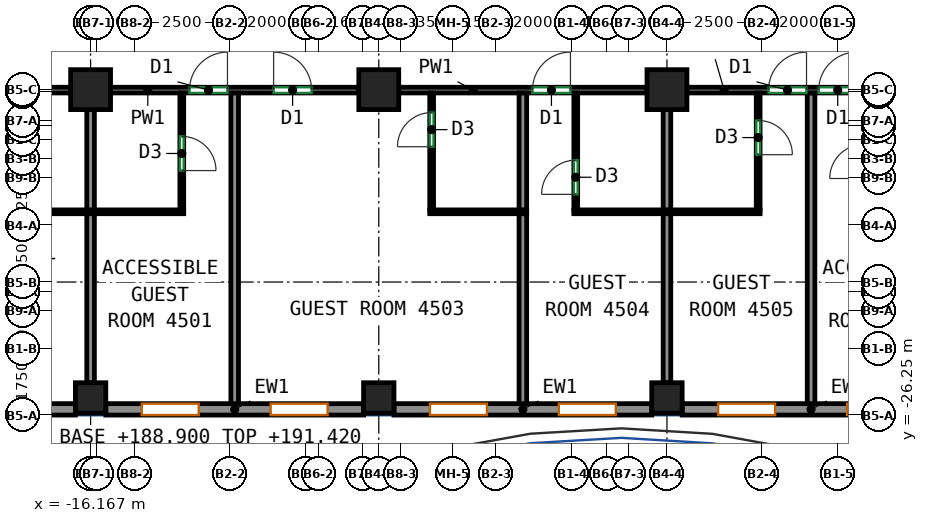
"""IFC4 building model, lengths in metres.
Left out: names, types, materials, properties, quantities, classifications, styles, units other than length and angle.
Written with IfcOpenShell. Run it as: python <this file> out.ifc"""

import sys

from ifc_helpers import new_model, si_unit, direction, frame, frame_2d, origin, origin_2d, place, context, subcontext, project, spatial, rectangle, extrude, source, transform, mapped, element, fill, save


model = new_model("IFC4")
c1 = context("Model", 3, precision=1e-05, world=origin(), true_north=direction((0.0, 1.0)))
c2 = subcontext(c1, "Body", "Model", "MODEL_VIEW")
j1 = project(units=[si_unit("LENGTHUNIT", "METRE"), si_unit("PLANEANGLEUNIT", "RADIAN")], contexts=[c1])
p1 = place(None, origin())
s1 = spatial("IfcSite", under=j1, at=p1, CompositionType="ELEMENT")
p2 = place(p1, origin())
s2 = spatial("IfcBuilding", under=s1, at=p2, CompositionType="ELEMENT")
p3 = place(p2, frame((0.0, 0.0, 188.9)))
s3 = spatial("IfcBuildingStorey", under=s2, at=p3, CompositionType="ELEMENT", Elevation=188.9)
m1 = source(origin(), c2, "Body", "SweptSolid", [
    extrude(rectangle(XDim=0.8, YDim=0.8, at=origin_2d()), origin(), (0.0, 0.0, 1.0), 3.12),
])
p4 = place(p3, frame((-16.167, -25.8, 0.0), z_axis=(0.0, 0.0, 1.0), x_axis=(1.0, 0.0, 0.0)))
e1 = element("IfcColumn", 1, at=p4, inside=s3, PredefinedType="COLUMN", context=c2, shape_type="MappedRepresentation", body=[
    mapped(m1, transform((0.0, 0.0, 0.0))),
])
m2 = source(origin(), c2, "Body", "SweptSolid", [
    extrude(rectangle(XDim=1.05, YDim=1.05, at=origin_2d()), origin(), (0.0, 0.0, 1.0), 3.12),
])
p5 = place(p3, frame((-16.167, -17.688, 0.0), z_axis=(0.0, 0.0, 1.0), x_axis=(1.0, 0.0, 0.0)))
e2 = element("IfcColumn", 2, at=p5, inside=s3, PredefinedType="COLUMN", context=c2, shape_type="MappedRepresentation", body=[
    mapped(m2, transform((0.0, 0.0, 0.0))),
])
p6 = place(p3, frame((-8.583, -25.8, 0.0), z_axis=(0.0, 0.0, 1.0), x_axis=(1.0, 0.0, 0.0)))
e3 = element("IfcColumn", 3, at=p6, inside=s3, PredefinedType="COLUMN", context=c2, shape_type="MappedRepresentation", body=[
    mapped(m1, transform((0.0, 0.0, 0.0))),
])
p7 = place(p3, frame((-8.583, -17.688, 0.0), z_axis=(0.0, 0.0, 1.0), x_axis=(1.0, 0.0, 0.0)))
e4 = element("IfcColumn", 4, at=p7, inside=s3, PredefinedType="COLUMN", context=c2, shape_type="MappedRepresentation", body=[
    mapped(m2, transform((0.0, 0.0, 0.0))),
])
p8 = place(p3, frame((-1.0, -25.8, 0.0), z_axis=(0.0, 0.0, 1.0), x_axis=(1.0, 0.0, 0.0)))
e5 = element("IfcColumn", 5, at=p8, inside=s3, PredefinedType="COLUMN", context=c2, shape_type="MappedRepresentation", body=[
    mapped(m1, transform((0.0, 0.0, 0.0))),
])
p9 = place(p3, frame((-1.0, -17.688, 0.0), z_axis=(0.0, 0.0, 1.0), x_axis=(1.0, 0.0, 0.0)))
e6 = element("IfcColumn", 6, at=p9, inside=s3, PredefinedType="COLUMN", context=c2, shape_type="MappedRepresentation", body=[
    mapped(m2, transform((0.0, 0.0, 0.0))),
])
m3 = source(origin(), c2, "Body", "SweptSolid", [
    extrude(rectangle(XDim=6.783, YDim=0.3, at=frame_2d((3.392, 0.0))), origin(), (0.0, 0.0, 1.0), 3.12),
])
p10 = place(p3, frame((-23.35, -26.1, 0.0), z_axis=(0.0, 0.0, 1.0), x_axis=(1.0, 0.0, 0.0)))
e7 = element("IfcWall", 7, at=p10, inside=s3, PredefinedType="SOLIDWALL", context=c2, shape_type="MappedRepresentation", body=[
    mapped(m3, transform((0.0, 0.0, 0.0))),
])
p11 = place(p10, frame((0.946, 0.0, 0.85)))
e8 = element("IfcOpeningElement", 8, at=p11, cuts=e7, PredefinedType="OPENING", context=c2, shape_type="SweptSolid", body=[
    extrude(rectangle(XDim=1.5, YDim=1.95, at=frame_2d((0.75, 0.975))), frame((0.0, 0.16, 0.0), z_axis=(0.0, -1.0, 0.0), x_axis=(1.0, 0.0, 0.0)), (0.0, 0.0, 1.0), 0.32),
])
p12 = place(p10, frame((4.337, 0.0, 0.85)))
e9 = element("IfcOpeningElement", 9, at=p12, cuts=e7, PredefinedType="OPENING", context=c2, shape_type="SweptSolid", body=[
    extrude(rectangle(XDim=1.5, YDim=1.95, at=frame_2d((0.75, 0.975))), frame((0.0, 0.16, 0.0), z_axis=(0.0, -1.0, 0.0), x_axis=(1.0, 0.0, 0.0)), (0.0, 0.0, 1.0), 0.32),
])
m4 = source(origin(), c2, "Body", "SweptSolid", [
    extrude(rectangle(XDim=6.783, YDim=0.3, at=frame_2d((3.392, 0.0))), origin(), (0.0, 0.0, 1.0), 3.12),
])
p13 = place(p3, frame((-15.767, -26.1, 0.0), z_axis=(0.0, 0.0, 1.0), x_axis=(1.0, 0.0, 0.0)))
e10 = element("IfcWall", 10, at=p13, inside=s3, PredefinedType="SOLIDWALL", context=c2, shape_type="MappedRepresentation", body=[
    mapped(m4, transform((0.0, 0.0, 0.0))),
])
p14 = place(p13, frame((0.946, 0.0, 0.85)))
e11 = element("IfcOpeningElement", 11, at=p14, cuts=e10, PredefinedType="OPENING", context=c2, shape_type="SweptSolid", body=[
    extrude(rectangle(XDim=1.5, YDim=1.95, at=frame_2d((0.75, 0.975))), frame((0.0, 0.16, 0.0), z_axis=(0.0, -1.0, 0.0), x_axis=(1.0, 0.0, 0.0)), (0.0, 0.0, 1.0), 0.32),
])
p15 = place(p13, frame((4.338, 0.0, 0.85)))
e12 = element("IfcOpeningElement", 12, at=p15, cuts=e10, PredefinedType="OPENING", context=c2, shape_type="SweptSolid", body=[
    extrude(rectangle(XDim=1.5, YDim=1.95, at=frame_2d((0.75, 0.975))), frame((0.0, 0.16, 0.0), z_axis=(0.0, -1.0, 0.0), x_axis=(1.0, 0.0, 0.0)), (0.0, 0.0, 1.0), 0.32),
])
p16 = place(p3, frame((-8.183, -26.1, 0.0), z_axis=(0.0, 0.0, 1.0), x_axis=(1.0, 0.0, 0.0)))
e13 = element("IfcWall", 13, at=p16, inside=s3, PredefinedType="SOLIDWALL", context=c2, shape_type="MappedRepresentation", body=[
    mapped(m3, transform((0.0, 0.0, 0.0))),
])
p17 = place(p16, frame((0.946, 0.0, 0.85)))
e14 = element("IfcOpeningElement", 14, at=p17, cuts=e13, PredefinedType="OPENING", context=c2, shape_type="SweptSolid", body=[
    extrude(rectangle(XDim=1.5, YDim=1.95, at=frame_2d((0.75, 0.975))), frame((0.0, 0.16, 0.0), z_axis=(0.0, -1.0, 0.0), x_axis=(1.0, 0.0, 0.0)), (0.0, 0.0, 1.0), 0.32),
])
p18 = place(p16, frame((4.337, 0.0, 0.85)))
e15 = element("IfcOpeningElement", 15, at=p18, cuts=e13, PredefinedType="OPENING", context=c2, shape_type="SweptSolid", body=[
    extrude(rectangle(XDim=1.5, YDim=1.95, at=frame_2d((0.75, 0.975))), frame((0.0, 0.16, 0.0), z_axis=(0.0, -1.0, 0.0), x_axis=(1.0, 0.0, 0.0)), (0.0, 0.0, 1.0), 0.32),
])
p19 = place(p3, frame((-0.6, -26.1, 0.0), z_axis=(0.0, 0.0, 1.0), x_axis=(1.0, 0.0, 0.0)))
e16 = element("IfcWall", 16, at=p19, inside=s3, PredefinedType="SOLIDWALL", context=c2, shape_type="MappedRepresentation", body=[
    mapped(m3, transform((0.0, 0.0, 0.0))),
])
p20 = place(p19, frame((0.946, 0.0, 0.85)))
e17 = element("IfcOpeningElement", 17, at=p20, cuts=e16, PredefinedType="OPENING", context=c2, shape_type="SweptSolid", body=[
    extrude(rectangle(XDim=1.5, YDim=1.95, at=frame_2d((0.75, 0.975))), frame((0.0, 0.16, 0.0), z_axis=(0.0, -1.0, 0.0), x_axis=(1.0, 0.0, 0.0)), (0.0, 0.0, 1.0), 0.32),
])
p21 = place(p19, frame((4.337, 0.0, 0.85)))
e18 = element("IfcOpeningElement", 18, at=p21, cuts=e16, PredefinedType="OPENING", context=c2, shape_type="SweptSolid", body=[
    extrude(rectangle(XDim=1.5, YDim=1.95, at=frame_2d((0.75, 0.975))), frame((0.0, 0.16, 0.0), z_axis=(0.0, -1.0, 0.0), x_axis=(1.0, 0.0, 0.0)), (0.0, 0.0, 1.0), 0.32),
])
p22 = place(p3, frame((-23.75, -17.7, 0.0), z_axis=(0.0, 0.0, 1.0), x_axis=(1.0, 0.0, 0.0)))
e19 = element("IfcWall", 19, at=p22, inside=s3, PredefinedType="PARTITIONING", context=c2, shape_type="SweptSolid", body=[
    extrude(rectangle(XDim=7.058, YDim=0.15, at=frame_2d((3.529, 0.0))), origin(), (0.0, 0.0, 1.0), 2.52),
])
p23 = place(p22, frame((0.201, 0.0, 0.0)))
e20 = element("IfcOpeningElement", 20, at=p23, cuts=e19, PredefinedType="OPENING", context=c2, shape_type="SweptSolid", body=[
    extrude(rectangle(XDim=1.0, YDim=2.1, at=frame_2d((0.5, 1.05))), frame((0.0, 0.085, 0.0), z_axis=(0.0, -1.0, 0.0), x_axis=(1.0, 0.0, 0.0)), (0.0, 0.0, 1.0), 0.17),
])
p24 = place(p22, frame((3.981, 0.0, 0.0)))
e21 = element("IfcOpeningElement", 21, at=p24, cuts=e19, PredefinedType="OPENING", context=c2, shape_type="SweptSolid", body=[
    extrude(rectangle(XDim=1.0, YDim=2.1, at=frame_2d((0.5, 1.05))), frame((0.0, 0.085, 0.0), z_axis=(0.0, -1.0, 0.0), x_axis=(1.0, 0.0, 0.0)), (0.0, 0.0, 1.0), 0.17),
])
p25 = place(p3, frame((-15.642, -17.7, 0.0), z_axis=(0.0, 0.0, 1.0), x_axis=(1.0, 0.0, 0.0)))
e22 = element("IfcWall", 22, at=p25, inside=s3, PredefinedType="PARTITIONING", context=c2, shape_type="SweptSolid", body=[
    extrude(rectangle(XDim=6.534, YDim=0.15, at=frame_2d((3.267, 0.0))), origin(), (0.0, 0.0, 1.0), 3.12),
])
p26 = place(p25, frame((2.077, 0.0, 0.0)))
e23 = element("IfcOpeningElement", 23, at=p26, cuts=e22, PredefinedType="OPENING", context=c2, shape_type="SweptSolid", body=[
    extrude(rectangle(XDim=1.0, YDim=2.1, at=frame_2d((0.5, 1.05))), frame((0.0, 0.085, 0.0), z_axis=(0.0, -1.0, 0.0), x_axis=(1.0, 0.0, 0.0)), (0.0, 0.0, 1.0), 0.17),
])
p27 = place(p25, frame((4.291, 0.0, 0.0)))
e24 = element("IfcOpeningElement", 24, at=p27, cuts=e22, PredefinedType="OPENING", context=c2, shape_type="SweptSolid", body=[
    extrude(rectangle(XDim=1.0, YDim=2.1, at=frame_2d((0.5, 1.05))), frame((0.0, 0.085, 0.0), z_axis=(0.0, -1.0, 0.0), x_axis=(1.0, 0.0, 0.0)), (0.0, 0.0, 1.0), 0.17),
])
p28 = place(p3, frame((-8.058, -17.7, 0.0), z_axis=(0.0, 0.0, 1.0), x_axis=(1.0, 0.0, 0.0)))
e25 = element("IfcWall", 25, at=p28, inside=s3, PredefinedType="PARTITIONING", context=c2, shape_type="SweptSolid", body=[
    extrude(rectangle(XDim=6.533, YDim=0.15, at=frame_2d((3.267, 0.0))), origin(), (0.0, 0.0, 1.0), 3.12),
])
p29 = place(p28, frame((3.518, 0.0, 0.0)))
e26 = element("IfcOpeningElement", 26, at=p29, cuts=e25, PredefinedType="OPENING", context=c2, shape_type="SweptSolid", body=[
    extrude(rectangle(XDim=1.0, YDim=2.1, at=frame_2d((0.5, 1.05))), frame((0.0, 0.085, 0.0), z_axis=(0.0, -1.0, 0.0), x_axis=(1.0, 0.0, 0.0)), (0.0, 0.0, 1.0), 0.17),
])
p30 = place(p3, frame((-0.475, -17.7, 0.0), z_axis=(0.0, 0.0, 1.0), x_axis=(1.0, 0.0, 0.0)))
e27 = element("IfcWall", 27, at=p30, inside=s3, PredefinedType="PARTITIONING", context=c2, shape_type="SweptSolid", body=[
    extrude(rectangle(XDim=6.533, YDim=0.15, at=frame_2d((3.267, 0.0))), origin(), (0.0, 0.0, 1.0), 3.12),
])
p31 = place(p30, frame((2.147, 0.0, 0.0)))
e28 = element("IfcOpeningElement", 28, at=p31, cuts=e27, PredefinedType="OPENING", context=c2, shape_type="SweptSolid", body=[
    extrude(rectangle(XDim=1.0, YDim=2.1, at=frame_2d((0.5, 1.05))), frame((0.0, 0.085, 0.0), z_axis=(0.0, -1.0, 0.0), x_axis=(1.0, 0.0, 0.0)), (0.0, 0.0, 1.0), 0.17),
])
p32 = place(p30, frame((3.468, 0.0, 0.0)))
e29 = element("IfcOpeningElement", 29, at=p32, cuts=e27, PredefinedType="OPENING", context=c2, shape_type="SweptSolid", body=[
    extrude(rectangle(XDim=1.0, YDim=2.1, at=frame_2d((0.5, 1.05))), frame((0.0, 0.085, 0.0), z_axis=(0.0, -1.0, 0.0), x_axis=(1.0, 0.0, 0.0)), (0.0, 0.0, 1.0), 0.17),
])
p33 = place(p3, frame((-18.617, -20.902, 0.0), z_axis=(0.0, 0.0, 1.0), x_axis=(1.0, 0.0, 0.0)))
e30 = element("IfcWall", 30, at=p33, inside=s3, PredefinedType="PARTITIONING", context=c2, shape_type="SweptSolid", body=[
    extrude(rectangle(XDim=4.9, YDim=0.1, at=frame_2d((2.45, 0.0))), origin(), (0.0, 0.0, 1.0), 3.12),
])
p34 = place(p3, frame((-16.167, -25.4, 0.0), z_axis=(0.0, 0.0, 1.0), x_axis=(0.0, 1.0, 0.0)))
e31 = element("IfcWall", 31, at=p34, inside=s3, PredefinedType="PARTITIONING", context=c2, shape_type="SweptSolid", body=[
    extrude(rectangle(XDim=4.448, YDim=0.2, at=frame_2d((2.224, 0.0))), origin(), (0.0, 0.0, 1.0), 3.12),
])
p35 = place(p3, frame((-16.167, -20.852, 0.0), z_axis=(0.0, 0.0, 1.0), x_axis=(0.0, 1.0, 0.0)))
e32 = element("IfcWall", 32, at=p35, inside=s3, PredefinedType="PARTITIONING", context=c2, shape_type="SweptSolid", body=[
    extrude(rectangle(XDim=2.64, YDim=0.2, at=frame_2d((1.32, 0.0))), origin(), (0.0, 0.0, 1.0), 3.12),
])
p36 = place(p3, frame((-13.767, -17.777, 0.0), z_axis=(0.0, 0.0, 1.0), x_axis=(0.0, -1.0, 0.0)))
e33 = element("IfcWall", 33, at=p36, inside=s3, PredefinedType="PARTITIONING", context=c2, shape_type="SweptSolid", body=[
    extrude(rectangle(XDim=3.075, YDim=0.1, at=frame_2d((1.538, 0.0))), origin(), (0.0, 0.0, 1.0), 3.12),
])
p37 = place(p36, frame((1.14, 0.0, 0.0)))
e34 = element("IfcOpeningElement", 34, at=p37, cuts=e33, PredefinedType="OPENING", context=c2, shape_type="SweptSolid", body=[
    extrude(rectangle(XDim=0.9, YDim=2.1, at=frame_2d((0.45, 1.05))), frame((0.0, 0.06, 0.0), z_axis=(0.0, -1.0, 0.0), x_axis=(1.0, 0.0, 0.0)), (0.0, 0.0, 1.0), 0.12),
])
p38 = place(p3, frame((-12.375, -26.0, 0.0), z_axis=(0.0, 0.0, 1.0), x_axis=(0.0, 1.0, 0.0)))
e35 = element("IfcWall", 35, at=p38, inside=s3, PredefinedType="PARTITIONING", context=c2, shape_type="SweptSolid", body=[
    extrude(rectangle(XDim=8.223, YDim=0.2, at=frame_2d((4.111, 0.0))), origin(), (0.0, 0.0, 1.0), 3.12),
])
p39 = place(p3, frame((-7.192, -20.852, 0.0), z_axis=(0.0, 0.0, 1.0), x_axis=(0.0, 1.0, 0.0)))
e36 = element("IfcWall", 36, at=p39, inside=s3, PredefinedType="PARTITIONING", context=c2, shape_type="SweptSolid", body=[
    extrude(rectangle(XDim=3.075, YDim=0.1, at=frame_2d((1.538, 0.0))), origin(), (0.0, 0.0, 1.0), 3.12),
])
p40 = place(p39, frame((1.662, 0.0, 0.0)))
e37 = element("IfcOpeningElement", 37, at=p40, cuts=e36, PredefinedType="OPENING", context=c2, shape_type="SweptSolid", body=[
    extrude(rectangle(XDim=0.9, YDim=2.1, at=frame_2d((0.45, 1.05))), frame((0.0, 0.06, 0.0), z_axis=(0.0, -1.0, 0.0), x_axis=(1.0, 0.0, 0.0)), (0.0, 0.0, 1.0), 0.12),
])
p41 = place(p3, frame((-7.242, -20.902, 0.0), z_axis=(0.0, 0.0, 1.0), x_axis=(1.0, 0.0, 0.0)))
e38 = element("IfcWall", 38, at=p41, inside=s3, PredefinedType="PARTITIONING", context=c2, shape_type="SweptSolid", body=[
    extrude(rectangle(XDim=2.55, YDim=0.1, at=frame_2d((1.275, 0.0))), origin(), (0.0, 0.0, 1.0), 3.12),
])
p42 = place(p3, frame((-4.792, -26.0, 0.0), z_axis=(0.0, 0.0, 1.0), x_axis=(0.0, 1.0, 0.0)))
e39 = element("IfcWall", 39, at=p42, inside=s3, PredefinedType="PARTITIONING", context=c2, shape_type="SweptSolid", body=[
    extrude(rectangle(XDim=5.048, YDim=0.2, at=frame_2d((2.524, 0.0))), origin(), (0.0, 0.0, 1.0), 3.12),
])
p43 = place(p3, frame((-4.792, -20.852, 0.0), z_axis=(0.0, 0.0, 1.0), x_axis=(0.0, 1.0, 0.0)))
e40 = element("IfcWall", 40, at=p43, inside=s3, PredefinedType="PARTITIONING", context=c2, shape_type="SweptSolid", body=[
    extrude(rectangle(XDim=3.075, YDim=0.2, at=frame_2d((1.538, 0.0))), origin(), (0.0, 0.0, 1.0), 3.12),
])
p44 = place(p3, frame((-3.4, -20.852, 0.0), z_axis=(0.0, 0.0, 1.0), x_axis=(0.0, 1.0, 0.0)))
e41 = element("IfcWall", 41, at=p44, inside=s3, PredefinedType="PARTITIONING", context=c2, shape_type="SweptSolid", body=[
    extrude(rectangle(XDim=3.075, YDim=0.1, at=frame_2d((1.538, 0.0))), origin(), (0.0, 0.0, 1.0), 3.12),
])
p45 = place(p44, frame((0.409, 0.0, 0.0)))
e42 = element("IfcOpeningElement", 42, at=p45, cuts=e41, PredefinedType="OPENING", context=c2, shape_type="SweptSolid", body=[
    extrude(rectangle(XDim=0.9, YDim=2.1, at=frame_2d((0.45, 1.05))), frame((0.0, 0.06, 0.0), z_axis=(0.0, -1.0, 0.0), x_axis=(1.0, 0.0, 0.0)), (0.0, 0.0, 1.0), 0.12),
])
p46 = place(p3, frame((-3.45, -20.902, 0.0), z_axis=(0.0, 0.0, 1.0), x_axis=(1.0, 0.0, 0.0)))
e43 = element("IfcWall", 43, at=p46, inside=s3, PredefinedType="PARTITIONING", context=c2, shape_type="SweptSolid", body=[
    extrude(rectangle(XDim=4.9, YDim=0.1, at=frame_2d((2.45, 0.0))), origin(), (0.0, 0.0, 1.0), 3.12),
])
p47 = place(p3, frame((-1.0, -25.4, 0.0), z_axis=(0.0, 0.0, 1.0), x_axis=(0.0, 1.0, 0.0)))
e44 = element("IfcWall", 44, at=p47, inside=s3, PredefinedType="PARTITIONING", context=c2, shape_type="SweptSolid", body=[
    extrude(rectangle(XDim=4.448, YDim=0.2, at=frame_2d((2.224, 0.0))), origin(), (0.0, 0.0, 1.0), 3.12),
])
p48 = place(p3, frame((-1.0, -20.852, 0.0), z_axis=(0.0, 0.0, 1.0), x_axis=(0.0, 1.0, 0.0)))
e45 = element("IfcWall", 45, at=p48, inside=s3, PredefinedType="PARTITIONING", context=c2, shape_type="SweptSolid", body=[
    extrude(rectangle(XDim=2.64, YDim=0.2, at=frame_2d((1.32, 0.0))), origin(), (0.0, 0.0, 1.0), 3.12),
])
p49 = place(p3, frame((1.4, -17.777, 0.0), z_axis=(0.0, 0.0, 1.0), x_axis=(0.0, -1.0, 0.0)))
e46 = element("IfcWall", 46, at=p49, inside=s3, PredefinedType="PARTITIONING", context=c2, shape_type="SweptSolid", body=[
    extrude(rectangle(XDim=3.075, YDim=0.1, at=frame_2d((1.538, 0.0))), origin(), (0.0, 0.0, 1.0), 3.12),
])
p50 = place(p49, frame((0.722, 0.0, 0.0)))
e47 = element("IfcOpeningElement", 47, at=p50, cuts=e46, PredefinedType="OPENING", context=c2, shape_type="SweptSolid", body=[
    extrude(rectangle(XDim=0.9, YDim=2.1, at=frame_2d((0.45, 1.05))), frame((0.0, 0.06, 0.0), z_axis=(0.0, -1.0, 0.0), x_axis=(1.0, 0.0, 0.0)), (0.0, 0.0, 1.0), 0.12),
])
p51 = place(p3, frame((2.792, -26.0, 0.0), z_axis=(0.0, 0.0, 1.0), x_axis=(0.0, 1.0, 0.0)))
e48 = element("IfcWall", 48, at=p51, inside=s3, PredefinedType="PARTITIONING", context=c2, shape_type="SweptSolid", body=[
    extrude(rectangle(XDim=8.223, YDim=0.2, at=frame_2d((4.111, 0.0))), origin(), (0.0, 0.0, 1.0), 3.12),
])
p52 = place(p14, origin())
e49 = element("IfcWindow", 49, at=p52, inside=s3, PartitioningType="SINGLE_PANEL", PredefinedType="WINDOW", context=c2, shape_type="SweptSolid", body=[
    extrude(rectangle(XDim=1.5, YDim=1.95, at=frame_2d((0.75, 0.975))), frame((0.0, 0.03, 0.0), z_axis=(0.0, -1.0, 0.0), x_axis=(1.0, 0.0, 0.0)), (0.0, 0.0, 1.0), 0.06),
])
fill(e11, e49)
p53 = place(p15, origin())
e50 = element("IfcWindow", 50, at=p53, inside=s3, PartitioningType="SINGLE_PANEL", PredefinedType="WINDOW", context=c2, shape_type="SweptSolid", body=[
    extrude(rectangle(XDim=1.5, YDim=1.95, at=frame_2d((0.75, 0.975))), frame((0.0, 0.03, 0.0), z_axis=(0.0, -1.0, 0.0), x_axis=(1.0, 0.0, 0.0)), (0.0, 0.0, 1.0), 0.06),
])
fill(e12, e50)
p54 = place(p17, origin())
e51 = element("IfcWindow", 51, at=p54, inside=s3, PartitioningType="SINGLE_PANEL", PredefinedType="WINDOW", context=c2, shape_type="SweptSolid", body=[
    extrude(rectangle(XDim=1.5, YDim=1.95, at=frame_2d((0.75, 0.975))), frame((0.0, 0.03, 0.0), z_axis=(0.0, -1.0, 0.0), x_axis=(1.0, 0.0, 0.0)), (0.0, 0.0, 1.0), 0.06),
])
fill(e14, e51)
p55 = place(p18, origin())
e52 = element("IfcWindow", 52, at=p55, inside=s3, PartitioningType="SINGLE_PANEL", PredefinedType="WINDOW", context=c2, shape_type="SweptSolid", body=[
    extrude(rectangle(XDim=1.5, YDim=1.95, at=frame_2d((0.75, 0.975))), frame((0.0, 0.03, 0.0), z_axis=(0.0, -1.0, 0.0), x_axis=(1.0, 0.0, 0.0)), (0.0, 0.0, 1.0), 0.06),
])
fill(e15, e52)
p56 = place(p20, origin())
e53 = element("IfcWindow", 53, at=p56, inside=s3, PartitioningType="SINGLE_PANEL", PredefinedType="WINDOW", context=c2, shape_type="SweptSolid", body=[
    extrude(rectangle(XDim=1.5, YDim=1.95, at=frame_2d((0.75, 0.975))), frame((0.0, 0.03, 0.0), z_axis=(0.0, -1.0, 0.0), x_axis=(1.0, 0.0, 0.0)), (0.0, 0.0, 1.0), 0.06),
])
fill(e17, e53)
p57 = place(p21, origin())
e54 = element("IfcWindow", 54, at=p57, inside=s3, PartitioningType="SINGLE_PANEL", PredefinedType="WINDOW", context=c2, shape_type="SweptSolid", body=[
    extrude(rectangle(XDim=1.5, YDim=1.95, at=frame_2d((0.75, 0.975))), frame((0.0, 0.03, 0.0), z_axis=(0.0, -1.0, 0.0), x_axis=(1.0, 0.0, 0.0)), (0.0, 0.0, 1.0), 0.06),
])
fill(e18, e54)
p58 = place(p45, origin())
e55 = element("IfcDoor", 55, at=p58, inside=s3, OperationType="SINGLE_SWING_LEFT", PredefinedType="DOOR", context=c2, shape_type="SweptSolid", body=[
    extrude(rectangle(XDim=0.9, YDim=2.1, at=frame_2d((0.45, 1.05))), frame((0.0, 0.025, 0.0), z_axis=(0.0, -1.0, 0.0), x_axis=(1.0, 0.0, 0.0)), (0.0, 0.0, 1.0), 0.05),
])
fill(e42, e55)
p59 = place(p37, origin())
e56 = element("IfcDoor", 56, at=p59, inside=s3, OperationType="SINGLE_SWING_RIGHT", PredefinedType="DOOR", context=c2, shape_type="SweptSolid", body=[
    extrude(rectangle(XDim=0.9, YDim=2.1, at=frame_2d((0.45, 1.05))), frame((0.0, 0.025, 0.0), z_axis=(0.0, -1.0, 0.0), x_axis=(1.0, 0.0, 0.0)), (0.0, 0.0, 1.0), 0.05),
])
fill(e34, e56)
p60 = place(p50, origin())
e57 = element("IfcDoor", 57, at=p60, inside=s3, OperationType="SINGLE_SWING_RIGHT", PredefinedType="DOOR", context=c2, shape_type="SweptSolid", body=[
    extrude(rectangle(XDim=0.9, YDim=2.1, at=frame_2d((0.45, 1.05))), frame((0.0, 0.025, 0.0), z_axis=(0.0, -1.0, 0.0), x_axis=(1.0, 0.0, 0.0)), (0.0, 0.0, 1.0), 0.05),
])
fill(e47, e57)
p61 = place(p40, origin())
e58 = element("IfcDoor", 58, at=p61, inside=s3, OperationType="SINGLE_SWING_LEFT", PredefinedType="DOOR", context=c2, shape_type="SweptSolid", body=[
    extrude(rectangle(XDim=0.9, YDim=2.1, at=frame_2d((0.45, 1.05))), frame((0.0, 0.025, 0.0), z_axis=(0.0, -1.0, 0.0), x_axis=(1.0, 0.0, 0.0)), (0.0, 0.0, 1.0), 0.05),
])
fill(e37, e58)
p62 = place(p26, origin())
e59 = element("IfcDoor", 59, at=p62, inside=s3, OperationType="SINGLE_SWING_RIGHT", PredefinedType="DOOR", context=c2, shape_type="SweptSolid", body=[
    extrude(rectangle(XDim=1.0, YDim=2.1, at=frame_2d((0.5, 1.05))), frame((0.0, 0.025, 0.0), z_axis=(0.0, -1.0, 0.0), x_axis=(1.0, 0.0, 0.0)), (0.0, 0.0, 1.0), 0.05),
])
fill(e23, e59)
p63 = place(p27, origin())
e60 = element("IfcDoor", 60, at=p63, inside=s3, OperationType="SINGLE_SWING_LEFT", PredefinedType="DOOR", context=c2, shape_type="SweptSolid", body=[
    extrude(rectangle(XDim=1.0, YDim=2.1, at=frame_2d((0.5, 1.05))), frame((0.0, 0.025, 0.0), z_axis=(0.0, -1.0, 0.0), x_axis=(1.0, 0.0, 0.0)), (0.0, 0.0, 1.0), 0.05),
])
fill(e24, e60)
p64 = place(p29, origin())
e61 = element("IfcDoor", 61, at=p64, inside=s3, OperationType="SINGLE_SWING_RIGHT", PredefinedType="DOOR", context=c2, shape_type="SweptSolid", body=[
    extrude(rectangle(XDim=1.0, YDim=2.1, at=frame_2d((0.5, 1.05))), frame((0.0, 0.025, 0.0), z_axis=(0.0, -1.0, 0.0), x_axis=(1.0, 0.0, 0.0)), (0.0, 0.0, 1.0), 0.05),
])
fill(e26, e61)
p65 = place(p31, origin())
e62 = element("IfcDoor", 62, at=p65, inside=s3, OperationType="SINGLE_SWING_RIGHT", PredefinedType="DOOR", context=c2, shape_type="SweptSolid", body=[
    extrude(rectangle(XDim=1.0, YDim=2.1, at=frame_2d((0.5, 1.05))), frame((0.0, 0.025, 0.0), z_axis=(0.0, -1.0, 0.0), x_axis=(1.0, 0.0, 0.0)), (0.0, 0.0, 1.0), 0.05),
])
fill(e28, e62)
p66 = place(p32, origin())
e63 = element("IfcDoor", 63, at=p66, inside=s3, OperationType="SINGLE_SWING_RIGHT", PredefinedType="DOOR", context=c2, shape_type="SweptSolid", body=[
    extrude(rectangle(XDim=1.0, YDim=2.1, at=frame_2d((0.5, 1.05))), frame((0.0, 0.025, 0.0), z_axis=(0.0, -1.0, 0.0), x_axis=(1.0, 0.0, 0.0)), (0.0, 0.0, 1.0), 0.05),
])
fill(e29, e63)
save(model, sys.argv[1])
